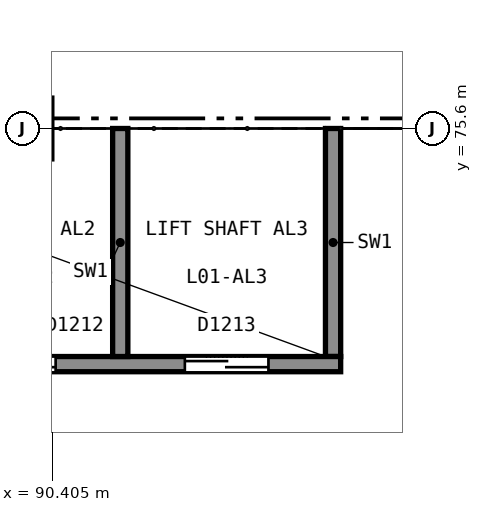
"""IFC4 building model, lengths in metres.
Left out: names, types, materials, properties, quantities, classifications, styles, units other than length and angle.
Written with IfcOpenShell. Run it as: python <this file> out.ifc"""

import sys

from ifc_helpers import new_model, si_unit, direction, frame, frame_2d, origin, origin_2d, place, context, subcontext, project, spatial, rectangle, extrude, element, fill, save


model = new_model("IFC4")
c1 = context("Model", 3, precision=1e-05, world=origin(), true_north=direction((0.0, 1.0)))
c2 = subcontext(c1, "Body", "Model", "MODEL_VIEW")
j1 = project(units=[si_unit("LENGTHUNIT", "METRE"), si_unit("PLANEANGLEUNIT", "RADIAN")], contexts=[c1])
p1 = place(None, origin())
s1 = spatial("IfcSite", under=j1, at=p1, CompositionType="ELEMENT")
p2 = place(p1, origin())
s2 = spatial("IfcBuilding", under=s1, at=p2, CompositionType="ELEMENT")
p3 = place(p2, frame((0.0, 0.0, 5.5)))
s3 = spatial("IfcBuildingStorey", under=s2, at=p3, CompositionType="ELEMENT", Elevation=5.5)
p4 = place(p3, frame((85.6, 72.5, 0.0), z_axis=(0.0, 0.0, 1.0), x_axis=(1.0, 0.0, 0.0)))
e1 = element("IfcWall", 1, at=p4, inside=s3, PredefinedType="SHEAR", context=c2, shape_type="SweptSolid", body=[
    extrude(rectangle(XDim=8.6, YDim=0.2, at=frame_2d((4.3, 0.0))), origin(), (0.0, 0.0, 1.0), 5.0),
])
p5 = place(p4, frame((0.95, 0.0, 0.0)))
e2 = element("IfcOpeningElement", 2, at=p5, cuts=e1, PredefinedType="OPENING", context=c2, shape_type="SweptSolid", body=[
    extrude(rectangle(XDim=1.1, YDim=2.1, at=frame_2d((0.55, 1.05))), frame((0.0, 0.11, 0.0), z_axis=(0.0, -1.0, 0.0), x_axis=(1.0, 0.0, 0.0)), (0.0, 0.0, 1.0), 0.22),
])
p6 = place(p4, frame((3.75, 0.0, 0.0)))
e3 = element("IfcOpeningElement", 3, at=p6, cuts=e1, PredefinedType="OPENING", context=c2, shape_type="SweptSolid", body=[
    extrude(rectangle(XDim=1.1, YDim=2.1, at=frame_2d((0.55, 1.05))), frame((0.0, 0.11, 0.0), z_axis=(0.0, -1.0, 0.0), x_axis=(1.0, 0.0, 0.0)), (0.0, 0.0, 1.0), 0.22),
])
p7 = place(p4, frame((6.55, 0.0, 0.0)))
e4 = element("IfcOpeningElement", 4, at=p7, cuts=e1, PredefinedType="OPENING", context=c2, shape_type="SweptSolid", body=[
    extrude(rectangle(XDim=1.1, YDim=2.1, at=frame_2d((0.55, 1.05))), frame((0.0, 0.11, 0.0), z_axis=(0.0, -1.0, 0.0), x_axis=(1.0, 0.0, 0.0)), (0.0, 0.0, 1.0), 0.22),
])
for number, where, z_axis, x_axis in (
    (5, (94.1, 72.6, 0.0), (0.0, 0.0, 1.0), (0.0, 1.0, 0.0)),
    (6, (91.3, 72.6, 0.0), (0.0, 0.0, 1.0), (0.0, 1.0, 0.0)),
):
    element("IfcWall", number, at=place(p3, frame(where, z_axis=z_axis, x_axis=x_axis)), inside=s3, PredefinedType="SHEAR", context=c2, shape_type="SweptSolid", body=[
        extrude(rectangle(XDim=3.0, YDim=0.2, at=frame_2d((1.5, 0.0))), origin(), (0.0, 0.0, 1.0), 5.0),
    ])
p8 = place(p3, frame((90.0, 75.6, 0.0), z_axis=(0.0, 0.0, 1.0), x_axis=(1.0, 0.0, 0.0)))
e7 = element("IfcColumn", 7, at=p8, inside=s3, PredefinedType="COLUMN", context=c2, shape_type="SweptSolid", body=[
    extrude(rectangle(XDim=0.8, YDim=0.8, at=origin_2d()), origin(), (0.0, 0.0, 1.0), 5.0),
])
p9 = place(p6, origin())
e8 = element("IfcDoor", 8, at=p9, inside=s3, OperationType="DOUBLE_DOOR_SLIDING", PredefinedType="DOOR", context=c2, shape_type="SweptSolid", body=[
    extrude(rectangle(XDim=1.1, YDim=2.1, at=frame_2d((0.55, 1.05))), frame((0.0, 0.025, 0.0), z_axis=(0.0, -1.0, 0.0), x_axis=(1.0, 0.0, 0.0)), (0.0, 0.0, 1.0), 0.05),
])
fill(e3, e8)
p10 = place(p7, origin())
e9 = element("IfcDoor", 9, at=p10, inside=s3, OperationType="DOUBLE_DOOR_SLIDING", PredefinedType="DOOR", context=c2, shape_type="SweptSolid", body=[
    extrude(rectangle(XDim=1.1, YDim=2.1, at=frame_2d((0.55, 1.05))), frame((0.0, 0.025, 0.0), z_axis=(0.0, -1.0, 0.0), x_axis=(1.0, 0.0, 0.0)), (0.0, 0.0, 1.0), 0.05),
])
fill(e4, e9)
save(model, sys.argv[1])
